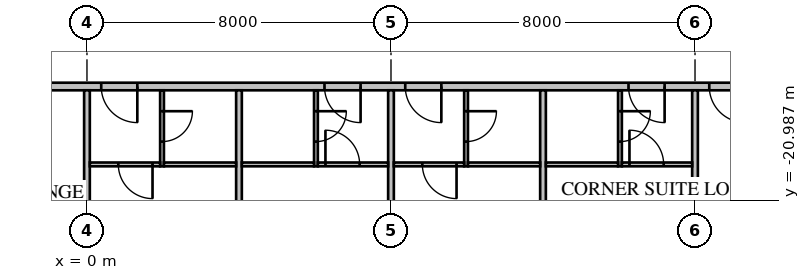
"""IFC4 building model, lengths in metres.
Left out: names, types, materials, properties, quantities, classifications, styles, units other than length and angle.
Written with IfcOpenShell. Run it as: python <this file> out.ifc"""

import sys

from ifc_helpers import new_model, si_unit, direction, frame, frame_2d, origin, place, context, subcontext, project, spatial, rectangle, extrude, element, fill, save


model = new_model("IFC4")
c1 = context("Model", 3, precision=1e-05, world=origin(), true_north=direction((0.0, 1.0)))
c2 = subcontext(c1, "Body", "Model", "MODEL_VIEW")
j1 = project(units=[si_unit("LENGTHUNIT", "METRE"), si_unit("PLANEANGLEUNIT", "RADIAN")], contexts=[c1])
p1 = place(None, origin())
s1 = spatial("IfcSite", under=j1, at=p1, CompositionType="ELEMENT")
p2 = place(p1, origin())
s2 = spatial("IfcBuilding", under=s1, at=p2, CompositionType="ELEMENT")
p3 = place(p2, frame((0.0, 0.0, 39.1)))
s3 = spatial("IfcBuildingStorey", under=s2, at=p3, CompositionType="ELEMENT", Elevation=39.1)
p4 = place(p3, frame((-18.0, -18.0, 0.0), z_axis=(0.0, 0.0, 1.0), x_axis=(1.0, 0.0, 0.0)))
e1 = element("IfcWall", 1, at=p4, inside=s3, PredefinedType="PARTITIONING", context=c2, shape_type="SweptSolid", body=[
    extrude(rectangle(XDim=36.0, YDim=0.2, at=frame_2d((18.0, 0.0))), origin(), (0.0, 0.0, 1.0), 3.65),
])
p5 = place(p4, frame((0.375, 0.0, 0.0)))
e2 = element("IfcOpeningElement", 2, at=p5, cuts=e1, PredefinedType="OPENING", context=c2, shape_type="SweptSolid", body=[
    extrude(rectangle(XDim=1.0, YDim=2.1, at=frame_2d((0.5, 1.05))), frame((0.0, 0.12, 0.0), z_axis=(0.0, -1.0, 0.0), x_axis=(1.0, 0.0, 0.0)), (0.0, 0.0, 1.0), 0.24),
])
p6 = place(p4, frame((2.45, 0.0, 0.0)))
e3 = element("IfcOpeningElement", 3, at=p6, cuts=e1, PredefinedType="OPENING", context=c2, shape_type="SweptSolid", body=[
    extrude(rectangle(XDim=0.8, YDim=2.1, at=frame_2d((0.4, 1.05))), frame((0.0, 0.12, 0.0), z_axis=(0.0, -1.0, 0.0), x_axis=(1.0, 0.0, 0.0)), (0.0, 0.0, 1.0), 0.24),
])
p7 = place(p4, frame((4.05, 0.0, 0.0)))
e4 = element("IfcOpeningElement", 4, at=p7, cuts=e1, PredefinedType="OPENING", context=c2, shape_type="SweptSolid", body=[
    extrude(rectangle(XDim=1.0, YDim=2.1, at=frame_2d((0.5, 1.05))), frame((0.0, 0.12, 0.0), z_axis=(0.0, -1.0, 0.0), x_axis=(1.0, 0.0, 0.0)), (0.0, 0.0, 1.0), 0.24),
])
p8 = place(p4, frame((6.45, 0.0, 0.0)))
e5 = element("IfcOpeningElement", 5, at=p8, cuts=e1, PredefinedType="OPENING", context=c2, shape_type="SweptSolid", body=[
    extrude(rectangle(XDim=0.9, YDim=2.1, at=frame_2d((0.45, 1.05))), frame((0.0, 0.12, 0.0), z_axis=(0.0, -1.0, 0.0), x_axis=(1.0, 0.0, 0.0)), (0.0, 0.0, 1.0), 0.24),
])
p9 = place(p4, frame((8.15, 0.0, 0.0)))
e6 = element("IfcOpeningElement", 6, at=p9, cuts=e1, PredefinedType="OPENING", context=c2, shape_type="SweptSolid", body=[
    extrude(rectangle(XDim=1.0, YDim=2.1, at=frame_2d((0.5, 1.05))), frame((0.0, 0.12, 0.0), z_axis=(0.0, -1.0, 0.0), x_axis=(1.0, 0.0, 0.0)), (0.0, 0.0, 1.0), 0.24),
])
p10 = place(p4, frame((18.375, 0.0, 0.0)))
e7 = element("IfcOpeningElement", 7, at=p10, cuts=e1, PredefinedType="OPENING", context=c2, shape_type="SweptSolid", body=[
    extrude(rectangle(XDim=0.95, YDim=2.1, at=frame_2d((0.475, 1.05))), frame((0.0, 0.12, 0.0), z_axis=(0.0, -1.0, 0.0), x_axis=(1.0, 0.0, 0.0)), (0.0, 0.0, 1.0), 0.24),
])
p11 = place(p4, frame((24.25, 0.0, 0.0)))
e8 = element("IfcOpeningElement", 8, at=p11, cuts=e1, PredefinedType="OPENING", context=c2, shape_type="SweptSolid", body=[
    extrude(rectangle(XDim=0.95, YDim=2.1, at=frame_2d((0.475, 1.05))), frame((0.0, 0.12, 0.0), z_axis=(0.0, -1.0, 0.0), x_axis=(1.0, 0.0, 0.0)), (0.0, 0.0, 1.0), 0.24),
])
p12 = place(p4, frame((26.375, 0.0, 0.0)))
e9 = element("IfcOpeningElement", 9, at=p12, cuts=e1, PredefinedType="OPENING", context=c2, shape_type="SweptSolid", body=[
    extrude(rectangle(XDim=0.95, YDim=2.1, at=frame_2d((0.475, 1.05))), frame((0.0, 0.12, 0.0), z_axis=(0.0, -1.0, 0.0), x_axis=(1.0, 0.0, 0.0)), (0.0, 0.0, 1.0), 0.24),
])
p13 = place(p4, frame((32.25, 0.0, 0.0)))
e10 = element("IfcOpeningElement", 10, at=p13, cuts=e1, PredefinedType="OPENING", context=c2, shape_type="SweptSolid", body=[
    extrude(rectangle(XDim=0.95, YDim=2.1, at=frame_2d((0.475, 1.05))), frame((0.0, 0.12, 0.0), z_axis=(0.0, -1.0, 0.0), x_axis=(1.0, 0.0, 0.0)), (0.0, 0.0, 1.0), 0.24),
])
p14 = place(p4, frame((34.375, 0.0, 0.0)))
e11 = element("IfcOpeningElement", 11, at=p14, cuts=e1, PredefinedType="OPENING", context=c2, shape_type="SweptSolid", body=[
    extrude(rectangle(XDim=0.95, YDim=2.1, at=frame_2d((0.475, 1.05))), frame((0.0, 0.12, 0.0), z_axis=(0.0, -1.0, 0.0), x_axis=(1.0, 0.0, 0.0)), (0.0, 0.0, 1.0), 0.24),
])
p15 = place(p4, frame((11.2, 0.0, 0.0)))
e12 = element("IfcOpeningElement", 12, at=p15, cuts=e1, PredefinedType="OPENING", context=c2, shape_type="SweptSolid", body=[
    extrude(rectangle(XDim=1.0, YDim=2.1, at=frame_2d((0.5, 1.05))), frame((0.0, 0.12, 0.0), z_axis=(0.0, -1.0, 0.0), x_axis=(1.0, 0.0, 0.0)), (0.0, 0.0, 1.0), 0.24),
])
p16 = place(p3, frame((0.0, -18.1, 0.0), z_axis=(0.0, 0.0, 1.0), x_axis=(0.0, -1.0, 0.0)))
e13 = element("IfcWall", 13, at=p16, inside=s3, PredefinedType="PARTITIONING", context=c2, shape_type="SweptSolid", body=[
    extrude(rectangle(XDim=6.6, YDim=0.15, at=frame_2d((3.3, 0.0))), origin(), (0.0, 0.0, 1.0), 2.809),
])
for number, where, z_axis, x_axis in (
    (14, (4.0, -18.1, 0.0), (0.0, 0.0, 1.0), (0.0, -1.0, 0.0)),
    (15, (8.0, -18.1, 0.0), (0.0, 0.0, 1.0), (0.0, -1.0, 0.0)),
    (16, (12.0, -18.1, 0.0), (0.0, 0.0, 1.0), (0.0, -1.0, 0.0)),
):
    element("IfcWall", number, at=place(p3, frame(where, z_axis=z_axis, x_axis=x_axis)), inside=s3, PredefinedType="PARTITIONING", context=c2, shape_type="SweptSolid", body=[
        extrude(rectangle(XDim=6.6, YDim=0.15, at=frame_2d((3.3, 0.0))), origin(), (0.0, 0.0, 1.0), 3.65),
    ])
p17 = place(p3, frame((16.0, -18.1, 0.0), z_axis=(0.0, 0.0, 1.0), x_axis=(0.0, -1.0, 0.0)))
e17 = element("IfcWall", 17, at=p17, inside=s3, PredefinedType="PARTITIONING", context=c2, shape_type="SweptSolid", body=[
    extrude(rectangle(XDim=6.589, YDim=0.15, at=frame_2d((3.295, 0.0))), origin(), (0.0, 0.0, 1.0), 3.65),
])
p18 = place(p3, frame((1.975, -18.1, 0.0), z_axis=(0.0, 0.0, 1.0), x_axis=(0.0, -1.0, 0.0)))
e18 = element("IfcWall", 18, at=p18, inside=s3, PredefinedType="PARTITIONING", context=c2, shape_type="SweptSolid", body=[
    extrude(rectangle(XDim=2.0, YDim=0.1, at=frame_2d((1.0, 0.0))), origin(), (0.0, 0.0, 1.0), 3.65),
])
p19 = place(p18, frame((0.55, 0.0, 0.0)))
e19 = element("IfcOpeningElement", 19, at=p19, cuts=e18, PredefinedType="OPENING", context=c2, shape_type="SweptSolid", body=[
    extrude(rectangle(XDim=0.8, YDim=2.1, at=frame_2d((0.4, 1.05))), frame((0.0, 0.07, 0.0), z_axis=(0.0, -1.0, 0.0), x_axis=(1.0, 0.0, 0.0)), (0.0, 0.0, 1.0), 0.14),
])
p20 = place(p3, frame((2.025, -20.05, 0.0), z_axis=(0.0, 0.0, 1.0), x_axis=(1.0, 0.0, 0.0)))
e20 = element("IfcWall", 20, at=p20, inside=s3, PredefinedType="PARTITIONING", context=c2, shape_type="SweptSolid", body=[
    extrude(rectangle(XDim=1.9, YDim=0.1, at=frame_2d((0.95, 0.0))), origin(), (0.0, 0.0, 1.0), 3.65),
])
p21 = place(p3, frame((6.025, -18.1, 0.0), z_axis=(0.0, 0.0, 1.0), x_axis=(0.0, -1.0, 0.0)))
e21 = element("IfcWall", 21, at=p21, inside=s3, PredefinedType="PARTITIONING", context=c2, shape_type="SweptSolid", body=[
    extrude(rectangle(XDim=2.0, YDim=0.1, at=frame_2d((1.0, 0.0))), origin(), (0.0, 0.0, 1.0), 3.65),
])
p22 = place(p21, frame((0.55, 0.0, 0.0)))
e22 = element("IfcOpeningElement", 22, at=p22, cuts=e21, PredefinedType="OPENING", context=c2, shape_type="SweptSolid", body=[
    extrude(rectangle(XDim=0.8, YDim=2.1, at=frame_2d((0.4, 1.05))), frame((0.0, 0.07, 0.0), z_axis=(0.0, -1.0, 0.0), x_axis=(1.0, 0.0, 0.0)), (0.0, 0.0, 1.0), 0.14),
])
p23 = place(p3, frame((4.075, -20.05, 0.0), z_axis=(0.0, 0.0, 1.0), x_axis=(1.0, 0.0, 0.0)))
e23 = element("IfcWall", 23, at=p23, inside=s3, PredefinedType="PARTITIONING", context=c2, shape_type="SweptSolid", body=[
    extrude(rectangle(XDim=1.9, YDim=0.1, at=frame_2d((0.95, 0.0))), origin(), (0.0, 0.0, 1.0), 3.65),
])
p24 = place(p3, frame((9.975, -18.1, 0.0), z_axis=(0.0, 0.0, 1.0), x_axis=(0.0, -1.0, 0.0)))
e24 = element("IfcWall", 24, at=p24, inside=s3, PredefinedType="PARTITIONING", context=c2, shape_type="SweptSolid", body=[
    extrude(rectangle(XDim=2.0, YDim=0.1, at=frame_2d((1.0, 0.0))), origin(), (0.0, 0.0, 1.0), 3.65),
])
p25 = place(p24, frame((0.55, 0.0, 0.0)))
e25 = element("IfcOpeningElement", 25, at=p25, cuts=e24, PredefinedType="OPENING", context=c2, shape_type="SweptSolid", body=[
    extrude(rectangle(XDim=0.8, YDim=2.1, at=frame_2d((0.4, 1.05))), frame((0.0, 0.07, 0.0), z_axis=(0.0, -1.0, 0.0), x_axis=(1.0, 0.0, 0.0)), (0.0, 0.0, 1.0), 0.14),
])
p26 = place(p3, frame((10.025, -20.05, 0.0), z_axis=(0.0, 0.0, 1.0), x_axis=(1.0, 0.0, 0.0)))
e26 = element("IfcWall", 26, at=p26, inside=s3, PredefinedType="PARTITIONING", context=c2, shape_type="SweptSolid", body=[
    extrude(rectangle(XDim=1.9, YDim=0.1, at=frame_2d((0.95, 0.0))), origin(), (0.0, 0.0, 1.0), 3.65),
])
p27 = place(p3, frame((14.025, -18.1, 0.0), z_axis=(0.0, 0.0, 1.0), x_axis=(0.0, -1.0, 0.0)))
e27 = element("IfcWall", 27, at=p27, inside=s3, PredefinedType="PARTITIONING", context=c2, shape_type="SweptSolid", body=[
    extrude(rectangle(XDim=2.0, YDim=0.1, at=frame_2d((1.0, 0.0))), origin(), (0.0, 0.0, 1.0), 3.65),
])
p28 = place(p27, frame((0.55, 0.0, 0.0)))
e28 = element("IfcOpeningElement", 28, at=p28, cuts=e27, PredefinedType="OPENING", context=c2, shape_type="SweptSolid", body=[
    extrude(rectangle(XDim=0.8, YDim=2.1, at=frame_2d((0.4, 1.05))), frame((0.0, 0.07, 0.0), z_axis=(0.0, -1.0, 0.0), x_axis=(1.0, 0.0, 0.0)), (0.0, 0.0, 1.0), 0.14),
])
p29 = place(p3, frame((12.075, -20.05, 0.0), z_axis=(0.0, 0.0, 1.0), x_axis=(1.0, 0.0, 0.0)))
e29 = element("IfcWall", 29, at=p29, inside=s3, PredefinedType="PARTITIONING", context=c2, shape_type="SweptSolid", body=[
    extrude(rectangle(XDim=1.9, YDim=0.1, at=frame_2d((0.95, 0.0))), origin(), (0.0, 0.0, 1.0), 3.65),
])
p30 = place(p3, frame((0.075, -20.05, 0.0), z_axis=(0.0, 0.0, 1.0), x_axis=(1.0, 0.0, 0.0)))
e30 = element("IfcWall", 30, at=p30, inside=s3, PredefinedType="PARTITIONING", context=c2, shape_type="SweptSolid", body=[
    extrude(rectangle(XDim=1.85, YDim=0.1, at=frame_2d((0.925, 0.0))), origin(), (0.0, 0.0, 1.0), 3.65),
])
p31 = place(p30, frame((0.75, 0.0, 0.0)))
e31 = element("IfcOpeningElement", 31, at=p31, cuts=e30, PredefinedType="OPENING", context=c2, shape_type="SweptSolid", body=[
    extrude(rectangle(XDim=0.9, YDim=2.1, at=frame_2d((0.45, 1.05))), frame((0.0, 0.07, 0.0), z_axis=(0.0, -1.0, 0.0), x_axis=(1.0, 0.0, 0.0)), (0.0, 0.0, 1.0), 0.14),
])
p32 = place(p3, frame((6.075, -20.05, 0.0), z_axis=(0.0, 0.0, 1.0), x_axis=(1.0, 0.0, 0.0)))
e32 = element("IfcWall", 32, at=p32, inside=s3, PredefinedType="PARTITIONING", context=c2, shape_type="SweptSolid", body=[
    extrude(rectangle(XDim=1.85, YDim=0.1, at=frame_2d((0.925, 0.0))), origin(), (0.0, 0.0, 1.0), 3.65),
])
p33 = place(p32, frame((0.2, 0.0, 0.0)))
e33 = element("IfcOpeningElement", 33, at=p33, cuts=e32, PredefinedType="OPENING", context=c2, shape_type="SweptSolid", body=[
    extrude(rectangle(XDim=0.9, YDim=2.1, at=frame_2d((0.45, 1.05))), frame((0.0, 0.07, 0.0), z_axis=(0.0, -1.0, 0.0), x_axis=(1.0, 0.0, 0.0)), (0.0, 0.0, 1.0), 0.14),
])
p34 = place(p3, frame((8.075, -20.05, 0.0), z_axis=(0.0, 0.0, 1.0), x_axis=(1.0, 0.0, 0.0)))
e34 = element("IfcWall", 34, at=p34, inside=s3, PredefinedType="PARTITIONING", context=c2, shape_type="SweptSolid", body=[
    extrude(rectangle(XDim=1.85, YDim=0.1, at=frame_2d((0.925, 0.0))), origin(), (0.0, 0.0, 1.0), 3.65),
])
p35 = place(p34, frame((0.75, 0.0, 0.0)))
e35 = element("IfcOpeningElement", 35, at=p35, cuts=e34, PredefinedType="OPENING", context=c2, shape_type="SweptSolid", body=[
    extrude(rectangle(XDim=0.9, YDim=2.1, at=frame_2d((0.45, 1.05))), frame((0.0, 0.07, 0.0), z_axis=(0.0, -1.0, 0.0), x_axis=(1.0, 0.0, 0.0)), (0.0, 0.0, 1.0), 0.14),
])
p36 = place(p3, frame((14.075, -20.05, 0.0), z_axis=(0.0, 0.0, 1.0), x_axis=(1.0, 0.0, 0.0)))
e36 = element("IfcWall", 36, at=p36, inside=s3, PredefinedType="PARTITIONING", context=c2, shape_type="SweptSolid", body=[
    extrude(rectangle(XDim=1.85, YDim=0.1, at=frame_2d((0.925, 0.0))), origin(), (0.0, 0.0, 1.0), 3.65),
])
p37 = place(p36, frame((0.2, 0.0, 0.0)))
e37 = element("IfcOpeningElement", 37, at=p37, cuts=e36, PredefinedType="OPENING", context=c2, shape_type="SweptSolid", body=[
    extrude(rectangle(XDim=0.9, YDim=2.1, at=frame_2d((0.45, 1.05))), frame((0.0, 0.07, 0.0), z_axis=(0.0, -1.0, 0.0), x_axis=(1.0, 0.0, 0.0)), (0.0, 0.0, 1.0), 0.14),
])
p38 = place(p10, origin())
e38 = element("IfcDoor", 38, at=p38, inside=s3, OperationType="SINGLE_SWING_RIGHT", PredefinedType="DOOR", context=c2, shape_type="SweptSolid", body=[
    extrude(rectangle(XDim=0.95, YDim=2.1, at=frame_2d((0.475, 1.05))), frame((0.0, 0.025, 0.0), z_axis=(0.0, -1.0, 0.0), x_axis=(1.0, 0.0, 0.0)), (0.0, 0.0, 1.0), 0.05),
])
fill(e7, e38)
p39 = place(p19, origin())
e39 = element("IfcDoor", 39, at=p39, inside=s3, OperationType="SINGLE_SWING_LEFT", PredefinedType="DOOR", context=c2, shape_type="SweptSolid", body=[
    extrude(rectangle(XDim=0.8, YDim=2.1, at=frame_2d((0.4, 1.05))), frame((0.0, 0.025, 0.0), z_axis=(0.0, -1.0, 0.0), x_axis=(1.0, 0.0, 0.0)), (0.0, 0.0, 1.0), 0.05),
])
fill(e19, e39)
p40 = place(p11, origin())
e40 = element("IfcDoor", 40, at=p40, inside=s3, OperationType="SINGLE_SWING_RIGHT", PredefinedType="DOOR", context=c2, shape_type="SweptSolid", body=[
    extrude(rectangle(XDim=0.95, YDim=2.1, at=frame_2d((0.475, 1.05))), frame((0.0, 0.025, 0.0), z_axis=(0.0, -1.0, 0.0), x_axis=(1.0, 0.0, 0.0)), (0.0, 0.0, 1.0), 0.05),
])
fill(e8, e40)
p41 = place(p22, origin())
e41 = element("IfcDoor", 41, at=p41, inside=s3, OperationType="SINGLE_SWING_LEFT", PredefinedType="DOOR", context=c2, shape_type="SweptSolid", body=[
    extrude(rectangle(XDim=0.8, YDim=2.1, at=frame_2d((0.4, 1.05))), frame((0.0, 0.025, 0.0), z_axis=(0.0, -1.0, 0.0), x_axis=(1.0, 0.0, 0.0)), (0.0, 0.0, 1.0), 0.05),
])
fill(e22, e41)
p42 = place(p12, origin())
e42 = element("IfcDoor", 42, at=p42, inside=s3, OperationType="SINGLE_SWING_RIGHT", PredefinedType="DOOR", context=c2, shape_type="SweptSolid", body=[
    extrude(rectangle(XDim=0.95, YDim=2.1, at=frame_2d((0.475, 1.05))), frame((0.0, 0.025, 0.0), z_axis=(0.0, -1.0, 0.0), x_axis=(1.0, 0.0, 0.0)), (0.0, 0.0, 1.0), 0.05),
])
fill(e9, e42)
p43 = place(p25, origin())
e43 = element("IfcDoor", 43, at=p43, inside=s3, OperationType="SINGLE_SWING_LEFT", PredefinedType="DOOR", context=c2, shape_type="SweptSolid", body=[
    extrude(rectangle(XDim=0.8, YDim=2.1, at=frame_2d((0.4, 1.05))), frame((0.0, 0.025, 0.0), z_axis=(0.0, -1.0, 0.0), x_axis=(1.0, 0.0, 0.0)), (0.0, 0.0, 1.0), 0.05),
])
fill(e25, e43)
p44 = place(p13, origin())
e44 = element("IfcDoor", 44, at=p44, inside=s3, OperationType="SINGLE_SWING_RIGHT", PredefinedType="DOOR", context=c2, shape_type="SweptSolid", body=[
    extrude(rectangle(XDim=0.95, YDim=2.1, at=frame_2d((0.475, 1.05))), frame((0.0, 0.025, 0.0), z_axis=(0.0, -1.0, 0.0), x_axis=(1.0, 0.0, 0.0)), (0.0, 0.0, 1.0), 0.05),
])
fill(e10, e44)
p45 = place(p28, origin())
e45 = element("IfcDoor", 45, at=p45, inside=s3, OperationType="SINGLE_SWING_LEFT", PredefinedType="DOOR", context=c2, shape_type="SweptSolid", body=[
    extrude(rectangle(XDim=0.8, YDim=2.1, at=frame_2d((0.4, 1.05))), frame((0.0, 0.025, 0.0), z_axis=(0.0, -1.0, 0.0), x_axis=(1.0, 0.0, 0.0)), (0.0, 0.0, 1.0), 0.05),
])
fill(e28, e45)
p46 = place(p14, origin())
e46 = element("IfcDoor", 46, at=p46, inside=s3, OperationType="SINGLE_SWING_RIGHT", PredefinedType="DOOR", context=c2, shape_type="SweptSolid", body=[
    extrude(rectangle(XDim=0.95, YDim=2.1, at=frame_2d((0.475, 1.05))), frame((0.0, 0.025, 0.0), z_axis=(0.0, -1.0, 0.0), x_axis=(1.0, 0.0, 0.0)), (0.0, 0.0, 1.0), 0.05),
])
fill(e11, e46)
p47 = place(p31, origin())
e47 = element("IfcDoor", 47, at=p47, inside=s3, OperationType="SINGLE_SWING_RIGHT", PredefinedType="DOOR", context=c2, shape_type="SweptSolid", body=[
    extrude(rectangle(XDim=0.9, YDim=2.1, at=frame_2d((0.45, 1.05))), frame((0.0, 0.025, 0.0), z_axis=(0.0, -1.0, 0.0), x_axis=(1.0, 0.0, 0.0)), (0.0, 0.0, 1.0), 0.05),
])
fill(e31, e47)
p48 = place(p33, origin())
e48 = element("IfcDoor", 48, at=p48, inside=s3, OperationType="SINGLE_SWING_LEFT", PredefinedType="DOOR", context=c2, shape_type="SweptSolid", body=[
    extrude(rectangle(XDim=0.9, YDim=2.1, at=frame_2d((0.45, 1.05))), frame((0.0, 0.025, 0.0), z_axis=(0.0, -1.0, 0.0), x_axis=(1.0, 0.0, 0.0)), (0.0, 0.0, 1.0), 0.05),
])
fill(e33, e48)
p49 = place(p35, origin())
e49 = element("IfcDoor", 49, at=p49, inside=s3, OperationType="SINGLE_SWING_RIGHT", PredefinedType="DOOR", context=c2, shape_type="SweptSolid", body=[
    extrude(rectangle(XDim=0.9, YDim=2.1, at=frame_2d((0.45, 1.05))), frame((0.0, 0.025, 0.0), z_axis=(0.0, -1.0, 0.0), x_axis=(1.0, 0.0, 0.0)), (0.0, 0.0, 1.0), 0.05),
])
fill(e35, e49)
p50 = place(p37, origin())
e50 = element("IfcDoor", 50, at=p50, inside=s3, OperationType="SINGLE_SWING_LEFT", PredefinedType="DOOR", context=c2, shape_type="SweptSolid", body=[
    extrude(rectangle(XDim=0.9, YDim=2.1, at=frame_2d((0.45, 1.05))), frame((0.0, 0.025, 0.0), z_axis=(0.0, -1.0, 0.0), x_axis=(1.0, 0.0, 0.0)), (0.0, 0.0, 1.0), 0.05),
])
fill(e37, e50)
save(model, sys.argv[1])
